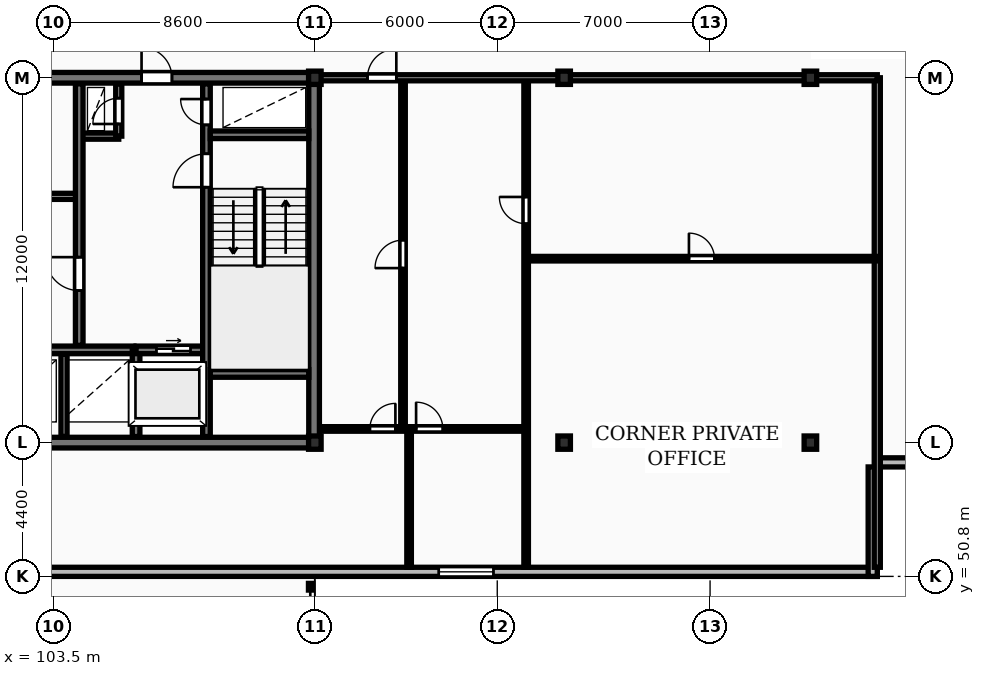
"""IFC4 building model, lengths in metres.
Left out: names, types, materials, properties, quantities, classifications, styles, units other than length and angle.
Written with IfcOpenShell. Run it as: python <this file> out.ifc"""

import sys

from ifc_helpers import new_model, si_unit, direction, frame, frame_2d, origin, origin_2d, place, context, subcontext, project, spatial, rectangle, i_section, extrude, element, fill, save


model = new_model("IFC4")
c1 = context("Model", 3, precision=1e-05, world=origin(), true_north=direction((0.0, 1.0)))
c2 = subcontext(c1, "Body", "Model", "MODEL_VIEW")
j1 = project(units=[si_unit("LENGTHUNIT", "METRE"), si_unit("PLANEANGLEUNIT", "RADIAN")], contexts=[c1])
p1 = place(None, origin())
s1 = spatial("IfcSite", under=j1, at=p1, CompositionType="ELEMENT")
p2 = place(p1, origin())
s2 = spatial("IfcBuilding", under=s1, at=p2, CompositionType="ELEMENT")
p3 = place(p2, frame((0.0, 0.0, 142.9)))
s3 = spatial("IfcBuildingStorey", under=s2, at=p3, CompositionType="ELEMENT", Elevation=142.9)
for number, where, z_axis, x_axis in (
    (1, (112.1, 55.2, 0.0), (0.0, 0.0, 1.0), (1.0, 0.0, 0.0)),
    (2, (112.1, 67.2, 0.0), (0.0, 0.0, 1.0), (1.0, 0.0, 0.0)),
    (3, (120.3, 55.2, 0.0), (0.0, 0.0, 1.0), (1.0, 0.0, 0.0)),
    (4, (120.3, 67.2, 0.0), (0.0, 0.0, 1.0), (1.0, 0.0, 0.0)),
    (5, (128.4, 55.2, 0.0), (0.0, 0.0, 1.0), (1.0, 0.0, 0.0)),
    (6, (128.4, 67.2, 0.0), (0.0, 0.0, 1.0), (1.0, 0.0, 0.0)),
):
    element("IfcColumn", number, at=place(p3, frame(where, z_axis=z_axis, x_axis=x_axis)), inside=s3, PredefinedType="COLUMN", context=c2, shape_type="SweptSolid", body=[
        extrude(i_section(OverallWidth=0.412, OverallDepth=0.437, WebThickness=0.036, FlangeThickness=0.052, FilletRadius=0.015, at=origin_2d()), origin(), (0.0, 0.0, 1.0), 3.6),
    ])
p4 = place(p3, frame((57.6, 50.95, 0.0), z_axis=(0.0, 0.0, 1.0), x_axis=(1.0, 0.0, 0.0)))
e7 = element("IfcWall", 7, at=p4, inside=s3, PredefinedType="STANDARD", context=c2, shape_type="SweptSolid", body=[
    extrude(rectangle(XDim=73.0, YDim=0.3, at=frame_2d((36.5, 0.0))), origin(), (0.0, 0.0, 1.0), 3.31),
])
p5 = place(p4, frame((15.225, 0.0, 0.85)))
e8 = element("IfcOpeningElement", 8, at=p5, cuts=e7, PredefinedType="OPENING", context=c2, shape_type="SweptSolid", body=[
    extrude(rectangle(XDim=1.8, YDim=1.8, at=frame_2d((0.9, 0.9))), frame((0.0, 0.16, 0.0), z_axis=(0.0, -1.0, 0.0), x_axis=(1.0, 0.0, 0.0)), (0.0, 0.0, 1.0), 0.32),
])
p6 = place(p4, frame((58.575, 0.0, 0.85)))
e9 = element("IfcOpeningElement", 9, at=p6, cuts=e7, PredefinedType="OPENING", context=c2, shape_type="SweptSolid", body=[
    extrude(rectangle(XDim=1.8, YDim=1.8, at=frame_2d((0.9, 0.9))), frame((0.0, 0.16, 0.0), z_axis=(0.0, -1.0, 0.0), x_axis=(1.0, 0.0, 0.0)), (0.0, 0.0, 1.0), 0.32),
])
p7 = place(p4, frame((33.45, 0.0, 0.0)))
e10 = element("IfcOpeningElement", 10, at=p7, cuts=e7, PredefinedType="OPENING", context=c2, shape_type="SweptSolid", body=[
    extrude(rectangle(XDim=1.1, YDim=2.1, at=frame_2d((0.55, 1.05))), frame((0.0, 0.16, 0.0), z_axis=(0.0, -1.0, 0.0), x_axis=(1.0, 0.0, 0.0)), (0.0, 0.0, 1.0), 0.32),
])
for number, where, z_axis, x_axis in (
    (11, (130.45, 50.8, 0.0), (0.0, 0.0, 1.0), (0.0, 1.0, 0.0)),
    (12, (130.6, 54.55, 0.0), (0.0, 0.0, 1.0), (1.0, 0.0, 0.0)),
):
    element("IfcWall", number, at=place(p3, frame(where, z_axis=z_axis, x_axis=x_axis)), inside=s3, PredefinedType="STANDARD", context=c2, shape_type="SweptSolid", body=[
        extrude(rectangle(XDim=3.6, YDim=0.3, at=frame_2d((1.8, 0.0))), origin(), (0.0, 0.0, 1.0), 3.31),
    ])
p8 = place(p3, frame((75.95, 55.2, 0.0), z_axis=(0.0, 0.0, 1.0), x_axis=(1.0, 0.0, 0.0)))
e13 = element("IfcWall", 13, at=p8, inside=s3, PredefinedType="SHEAR", context=c2, shape_type="SweptSolid", body=[
    extrude(rectangle(XDim=36.3, YDim=0.35, at=frame_2d((18.15, 0.0))), origin(), (0.0, 0.0, 1.0), 3.6),
])
p9 = place(p8, frame((15.1, 0.0, 0.0)))
e14 = element("IfcOpeningElement", 14, at=p9, cuts=e13, PredefinedType="OPENING", context=c2, shape_type="SweptSolid", body=[
    extrude(rectangle(XDim=1.1, YDim=2.1, at=frame_2d((0.55, 1.05))), frame((0.0, 0.185, 0.0), z_axis=(0.0, -1.0, 0.0), x_axis=(1.0, 0.0, 0.0)), (0.0, 0.0, 1.0), 0.37),
])
p10 = place(p3, frame((112.075, 55.375, 0.0), z_axis=(0.0, 0.0, 1.0), x_axis=(0.0, 1.0, 0.0)))
e15 = element("IfcWall", 15, at=p10, inside=s3, PredefinedType="SHEAR", context=c2, shape_type="SweptSolid", body=[
    extrude(rectangle(XDim=11.65, YDim=0.35, at=frame_2d((5.825, 0.0))), origin(), (0.0, 0.0, 1.0), 3.6),
])
p11 = place(p3, frame((75.95, 67.2, 0.0), z_axis=(0.0, 0.0, 1.0), x_axis=(1.0, 0.0, 0.0)))
e16 = element("IfcWall", 16, at=p11, inside=s3, PredefinedType="SHEAR", context=c2, shape_type="SweptSolid", body=[
    extrude(rectangle(XDim=36.3, YDim=0.35, at=frame_2d((18.15, 0.0))), origin(), (0.0, 0.0, 1.0), 3.6),
])
p12 = place(p11, frame((5.25, 0.0, 0.0)))
e17 = element("IfcOpeningElement", 17, at=p12, cuts=e16, PredefinedType="OPENING", context=c2, shape_type="SweptSolid", body=[
    extrude(rectangle(XDim=1.0, YDim=2.15, at=frame_2d((0.5, 1.075))), frame((0.0, 0.185, 0.0), z_axis=(0.0, -1.0, 0.0), x_axis=(1.0, 0.0, 0.0)), (0.0, 0.0, 1.0), 0.37),
])
p13 = place(p11, frame((21.6, 0.0, 0.0)))
e18 = element("IfcOpeningElement", 18, at=p13, cuts=e16, PredefinedType="OPENING", context=c2, shape_type="SweptSolid", body=[
    extrude(rectangle(XDim=1.5, YDim=2.2, at=frame_2d((0.75, 1.1))), frame((0.0, 0.185, 0.0), z_axis=(0.0, -1.0, 0.0), x_axis=(1.0, 0.0, 0.0)), (0.0, 0.0, 1.0), 0.37),
])
p14 = place(p11, frame((30.45, 0.0, 0.0)))
e19 = element("IfcOpeningElement", 19, at=p14, cuts=e16, PredefinedType="OPENING", context=c2, shape_type="SweptSolid", body=[
    extrude(rectangle(XDim=1.0, YDim=2.15, at=frame_2d((0.5, 1.075))), frame((0.0, 0.185, 0.0), z_axis=(0.0, -1.0, 0.0), x_axis=(1.0, 0.0, 0.0)), (0.0, 0.0, 1.0), 0.37),
])
p15 = place(p3, frame((103.85, 55.4, 0.0), z_axis=(0.0, 0.0, 1.0), x_axis=(0.0, 1.0, 0.0)))
e20 = element("IfcWall", 20, at=p15, inside=s3, PredefinedType="PARTITIONING", context=c2, shape_type="SweptSolid", body=[
    extrude(rectangle(XDim=2.72, YDim=0.2, at=frame_2d((1.36, 0.0))), origin(), (0.0, 0.0, 1.0), 3.31),
])
p16 = place(p3, frame((101.55, 58.25, 0.0), z_axis=(0.0, 0.0, 1.0), x_axis=(1.0, 0.0, 0.0)))
e21 = element("IfcWall", 21, at=p16, inside=s3, PredefinedType="SHEAR", context=c2, shape_type="SweptSolid", body=[
    extrude(rectangle(XDim=4.6, YDim=0.25, at=frame_2d((2.3, 0.0))), origin(), (0.0, 0.0, 1.0), 3.6),
])
p17 = place(p3, frame((106.22, 55.4, 0.0), z_axis=(0.0, 0.0, 1.0), x_axis=(0.0, 1.0, 0.0)))
e22 = element("IfcWall", 22, at=p17, inside=s3, PredefinedType="SHEAR", context=c2, shape_type="SweptSolid", body=[
    extrude(rectangle(XDim=2.85, YDim=0.25, at=frame_2d((1.425, 0.0))), origin(), (0.0, 0.0, 1.0), 3.6),
])
p18 = place(p3, frame((106.22, 58.25, 0.0), z_axis=(0.0, 0.0, 1.0), x_axis=(1.0, 0.0, 0.0)))
e23 = element("IfcWall", 23, at=p18, inside=s3, PredefinedType="SHEAR", context=c2, shape_type="SweptSolid", body=[
    extrude(rectangle(XDim=2.46, YDim=0.25, at=frame_2d((1.23, 0.0))), origin(), (0.0, 0.0, 1.0), 3.6),
])
p19 = place(p18, frame((0.67, 0.0, 0.0)))
e24 = element("IfcOpeningElement", 24, at=p19, cuts=e23, PredefinedType="OPENING", context=c2, shape_type="SweptSolid", body=[
    extrude(rectangle(XDim=1.12, YDim=2.12, at=frame_2d((0.56, 1.06))), frame((0.0, 0.135, 0.0), z_axis=(0.0, -1.0, 0.0), x_axis=(1.0, 0.0, 0.0)), (0.0, 0.0, 1.0), 0.27),
])
p20 = place(p3, frame((84.42, 63.3, 0.0), z_axis=(0.0, 0.0, 1.0), x_axis=(1.0, 0.0, 0.0)))
e25 = element("IfcWall", 25, at=p20, inside=s3, PredefinedType="PARTITIONING", context=c2, shape_type="SweptSolid", body=[
    extrude(rectangle(XDim=19.83, YDim=0.2, at=frame_2d((9.915, 0.0))), origin(), (0.0, 0.0, 1.0), 3.31),
])
p21 = place(p20, frame((1.15, 0.0, 0.0)))
e26 = element("IfcOpeningElement", 26, at=p21, cuts=e25, PredefinedType="OPENING", context=c2, shape_type="SweptSolid", body=[
    extrude(rectangle(XDim=0.85, YDim=2.05, at=frame_2d((0.425, 1.025))), frame((0.0, 0.11, 0.0), z_axis=(0.0, -1.0, 0.0), x_axis=(1.0, 0.0, 0.0)), (0.0, 0.0, 1.0), 0.22),
])
p22 = place(p20, frame((3.25, 0.0, 0.0)))
e27 = element("IfcOpeningElement", 27, at=p22, cuts=e25, PredefinedType="OPENING", context=c2, shape_type="SweptSolid", body=[
    extrude(rectangle(XDim=0.85, YDim=2.05, at=frame_2d((0.425, 1.025))), frame((0.0, 0.11, 0.0), z_axis=(0.0, -1.0, 0.0), x_axis=(1.0, 0.0, 0.0)), (0.0, 0.0, 1.0), 0.22),
])
p23 = place(p20, frame((13.08, 0.0, 0.0)))
e28 = element("IfcOpeningElement", 28, at=p23, cuts=e25, PredefinedType="OPENING", context=c2, shape_type="SweptSolid", body=[
    extrude(rectangle(XDim=1.5, YDim=2.2, at=frame_2d((0.75, 1.1))), frame((0.0, 0.11, 0.0), z_axis=(0.0, -1.0, 0.0), x_axis=(1.0, 0.0, 0.0)), (0.0, 0.0, 1.0), 0.22),
])
p24 = place(p20, frame((6.68, 0.0, 0.0)))
e29 = element("IfcOpeningElement", 29, at=p24, cuts=e25, PredefinedType="OPENING", context=c2, shape_type="SweptSolid", body=[
    extrude(rectangle(XDim=0.92, YDim=2.08, at=frame_2d((0.46, 1.04))), frame((0.0, 0.11, 0.0), z_axis=(0.0, -1.0, 0.0), x_axis=(1.0, 0.0, 0.0)), (0.0, 0.0, 1.0), 0.22),
])
p25 = place(p20, frame((16.33, 0.0, 0.0)))
e30 = element("IfcOpeningElement", 30, at=p25, cuts=e25, PredefinedType="OPENING", context=c2, shape_type="SweptSolid", body=[
    extrude(rectangle(XDim=0.88, YDim=2.06, at=frame_2d((0.44, 1.03))), frame((0.0, 0.11, 0.0), z_axis=(0.0, -1.0, 0.0), x_axis=(1.0, 0.0, 0.0)), (0.0, 0.0, 1.0), 0.22),
])
p26 = place(p3, frame((104.45, 65.28, 0.0), z_axis=(0.0, 0.0, 1.0), x_axis=(1.0, 0.0, 0.0)))
e31 = element("IfcWall", 31, at=p26, inside=s3, PredefinedType="PARTITIONING", context=c2, shape_type="SweptSolid", body=[
    extrude(rectangle(XDim=1.2, YDim=0.2, at=frame_2d((0.6, 0.0))), origin(), (0.0, 0.0, 1.0), 3.31),
])
p27 = place(p3, frame((105.65, 65.28, 0.0), z_axis=(0.0, 0.0, 1.0), x_axis=(0.0, 1.0, 0.0)))
e32 = element("IfcWall", 32, at=p27, inside=s3, PredefinedType="PARTITIONING", context=c2, shape_type="SweptSolid", body=[
    extrude(rectangle(XDim=1.72, YDim=0.2, at=frame_2d((0.86, 0.0))), origin(), (0.0, 0.0, 1.0), 3.31),
])
p28 = place(p27, frame((0.4, 0.0, 0.0)))
e33 = element("IfcOpeningElement", 33, at=p28, cuts=e32, PredefinedType="OPENING", context=c2, shape_type="SweptSolid", body=[
    extrude(rectangle(XDim=0.85, YDim=2.05, at=frame_2d((0.425, 1.025))), frame((0.0, 0.11, 0.0), z_axis=(0.0, -1.0, 0.0), x_axis=(1.0, 0.0, 0.0)), (0.0, 0.0, 1.0), 0.22),
])
p29 = place(p3, frame((104.35, 58.4, 0.0), z_axis=(0.0, 0.0, 1.0), x_axis=(0.0, 1.0, 0.0)))
e34 = element("IfcWall", 34, at=p29, inside=s3, PredefinedType="SHEAR", context=c2, shape_type="SweptSolid", body=[
    extrude(rectangle(XDim=8.6, YDim=0.25, at=frame_2d((4.3, 0.0))), origin(), (0.0, 0.0, 1.0), 3.6),
])
p30 = place(p29, frame((1.8, 0.0, 0.0)))
e35 = element("IfcOpeningElement", 35, at=p30, cuts=e34, PredefinedType="OPENING", context=c2, shape_type="SweptSolid", body=[
    extrude(rectangle(XDim=1.1, YDim=2.1, at=frame_2d((0.55, 1.05))), frame((0.0, 0.135, 0.0), z_axis=(0.0, -1.0, 0.0), x_axis=(1.0, 0.0, 0.0)), (0.0, 0.0, 1.0), 0.27),
])
p31 = place(p3, frame((108.535, 55.4, 0.0), z_axis=(0.0, 0.0, 1.0), x_axis=(0.0, 1.0, 0.0)))
e36 = element("IfcWall", 36, at=p31, inside=s3, PredefinedType="SHEAR", context=c2, shape_type="SweptSolid", body=[
    extrude(rectangle(XDim=11.6, YDim=0.25, at=frame_2d((5.8, 0.0))), origin(), (0.0, 0.0, 1.0), 3.6),
])
p32 = place(p31, frame((8.2, 0.0, 0.0)))
e37 = element("IfcOpeningElement", 37, at=p32, cuts=e36, PredefinedType="OPENING", context=c2, shape_type="SweptSolid", body=[
    extrude(rectangle(XDim=1.1, YDim=2.1, at=frame_2d((0.55, 1.05))), frame((0.0, 0.135, 0.0), z_axis=(0.0, -1.0, 0.0), x_axis=(1.0, 0.0, 0.0)), (0.0, 0.0, 1.0), 0.27),
])
p33 = place(p31, frame((10.25, 0.0, 0.0)))
e38 = element("IfcOpeningElement", 38, at=p33, cuts=e36, PredefinedType="OPENING", context=c2, shape_type="SweptSolid", body=[
    extrude(rectangle(XDim=0.85, YDim=2.05, at=frame_2d((0.425, 1.025))), frame((0.0, 0.135, 0.0), z_axis=(0.0, -1.0, 0.0), x_axis=(1.0, 0.0, 0.0)), (0.0, 0.0, 1.0), 0.27),
])
for number, where, z_axis, x_axis in (
    (39, (108.66, 57.475, 0.0), (0.0, 0.0, 1.0), (1.0, 0.0, 0.0)),
    (40, (108.66, 65.325, 0.0), (0.0, 0.0, 1.0), (1.0, 0.0, 0.0)),
):
    element("IfcWall", number, at=place(p3, frame(where, z_axis=z_axis, x_axis=x_axis)), inside=s3, PredefinedType="SHEAR", context=c2, shape_type="SweptSolid", body=[
        extrude(rectangle(XDim=3.24, YDim=0.25, at=frame_2d((1.62, 0.0))), origin(), (0.0, 0.0, 1.0), 3.6),
    ])
p34 = place(p3, frame((130.6, 51.1, 0.0), z_axis=(0.0, 0.0, 1.0), x_axis=(0.0, 1.0, 0.0)))
e41 = element("IfcWall", 41, at=p34, inside=s3, PredefinedType="PARTITIONING", context=c2, shape_type="SweptSolid", body=[
    extrude(rectangle(XDim=16.1, YDim=0.2, at=frame_2d((8.05, 0.0))), origin(), (0.0, 0.0, 1.0), 3.31),
])
p35 = place(p3, frame((119.05, 61.25, 0.0), z_axis=(0.0, 0.0, 1.0), x_axis=(1.0, 0.0, 0.0)))
e42 = element("IfcWall", 42, at=p35, inside=s3, PredefinedType="PARTITIONING", context=c2, shape_type="SweptSolid", body=[
    extrude(rectangle(XDim=11.55, YDim=0.15, at=frame_2d((5.775, 0.0))), origin(), (0.0, 0.0, 1.0), 3.31),
])
p36 = place(p35, frame((5.355, 0.0, 0.0)))
e43 = element("IfcOpeningElement", 43, at=p36, cuts=e42, PredefinedType="OPENING", context=c2, shape_type="SweptSolid", body=[
    extrude(rectangle(XDim=0.84, YDim=2.04, at=frame_2d((0.42, 1.02))), frame((0.0, 0.085, 0.0), z_axis=(0.0, -1.0, 0.0), x_axis=(1.0, 0.0, 0.0)), (0.0, 0.0, 1.0), 0.17),
])
p37 = place(p3, frame((119.05, 51.1, 0.0), z_axis=(0.0, 0.0, 1.0), x_axis=(0.0, 1.0, 0.0)))
e44 = element("IfcWall", 44, at=p37, inside=s3, PredefinedType="PARTITIONING", context=c2, shape_type="SweptSolid", body=[
    extrude(rectangle(XDim=16.05, YDim=0.15, at=frame_2d((8.025, 0.0))), origin(), (0.0, 0.0, 1.0), 3.31),
])
p38 = place(p37, frame((11.3, 0.0, 0.0)))
e45 = element("IfcOpeningElement", 45, at=p38, cuts=e44, PredefinedType="OPENING", context=c2, shape_type="SweptSolid", body=[
    extrude(rectangle(XDim=0.88, YDim=2.06, at=frame_2d((0.44, 1.03))), frame((0.0, 0.085, 0.0), z_axis=(0.0, -1.0, 0.0), x_axis=(1.0, 0.0, 0.0)), (0.0, 0.0, 1.0), 0.17),
])
p39 = place(p3, frame((115.0, 55.65, 0.0), z_axis=(0.0, 0.0, 1.0), x_axis=(0.0, 1.0, 0.0)))
e46 = element("IfcWall", 46, at=p39, inside=s3, PredefinedType="PARTITIONING", context=c2, shape_type="SweptSolid", body=[
    extrude(rectangle(XDim=11.5, YDim=0.15, at=frame_2d((5.75, 0.0))), origin(), (0.0, 0.0, 1.0), 3.31),
])
p40 = place(p39, frame((5.29, 0.0, 0.0)))
e47 = element("IfcOpeningElement", 47, at=p40, cuts=e46, PredefinedType="OPENING", context=c2, shape_type="SweptSolid", body=[
    extrude(rectangle(XDim=0.92, YDim=2.08, at=frame_2d((0.46, 1.04))), frame((0.0, 0.085, 0.0), z_axis=(0.0, -1.0, 0.0), x_axis=(1.0, 0.0, 0.0)), (0.0, 0.0, 1.0), 0.17),
])
p41 = place(p3, frame((115.2, 51.1, 0.0), z_axis=(0.0, 0.0, 1.0), x_axis=(0.0, 1.0, 0.0)))
e48 = element("IfcWall", 48, at=p41, inside=s3, PredefinedType="PARTITIONING", context=c2, shape_type="SweptSolid", body=[
    extrude(rectangle(XDim=4.55, YDim=0.15, at=frame_2d((2.275, 0.0))), origin(), (0.0, 0.0, 1.0), 3.31),
])
p42 = place(p3, frame((112.27, 55.65, 0.0), z_axis=(0.0, 0.0, 1.0), x_axis=(1.0, 0.0, 0.0)))
e49 = element("IfcWall", 49, at=p42, inside=s3, PredefinedType="PARTITIONING", context=c2, shape_type="SweptSolid", body=[
    extrude(rectangle(XDim=6.76, YDim=0.15, at=frame_2d((3.38, 0.0))), origin(), (0.0, 0.0, 1.0), 3.31),
])
p43 = place(p42, frame((1.64, 0.0, 0.0)))
e50 = element("IfcOpeningElement", 50, at=p43, cuts=e49, PredefinedType="OPENING", context=c2, shape_type="SweptSolid", body=[
    extrude(rectangle(XDim=0.84, YDim=2.04, at=frame_2d((0.42, 1.02))), frame((0.0, 0.085, 0.0), z_axis=(0.0, -1.0, 0.0), x_axis=(1.0, 0.0, 0.0)), (0.0, 0.0, 1.0), 0.17),
])
p44 = place(p42, frame((3.16, 0.0, 0.0)))
e51 = element("IfcOpeningElement", 51, at=p44, cuts=e49, PredefinedType="OPENING", context=c2, shape_type="SweptSolid", body=[
    extrude(rectangle(XDim=0.88, YDim=2.06, at=frame_2d((0.44, 1.03))), frame((0.0, 0.085, 0.0), z_axis=(0.0, -1.0, 0.0), x_axis=(1.0, 0.0, 0.0)), (0.0, 0.0, 1.0), 0.17),
])
p45 = place(p3, frame((112.25, 67.2, 0.0), z_axis=(0.0, 0.0, 1.0), x_axis=(1.0, 0.0, 0.0)))
e52 = element("IfcWall", 52, at=p45, inside=s3, PredefinedType="PARTITIONING", context=c2, shape_type="SweptSolid", body=[
    extrude(rectangle(XDim=18.35, YDim=0.2, at=frame_2d((9.175, 0.0))), origin(), (0.0, 0.0, 1.0), 2.773),
])
p46 = place(p45, frame((1.58, 0.0, 0.0)))
e53 = element("IfcOpeningElement", 53, at=p46, cuts=e52, PredefinedType="OPENING", context=c2, shape_type="SweptSolid", body=[
    extrude(rectangle(XDim=0.95, YDim=2.15, at=frame_2d((0.475, 1.075))), frame((0.0, 0.11, 0.0), z_axis=(0.0, -1.0, 0.0), x_axis=(1.0, 0.0, 0.0)), (0.0, 0.0, 1.0), 0.22),
])
p47 = place(p6, origin())
e54 = element("IfcWindow", 54, at=p47, inside=s3, PartitioningType="SINGLE_PANEL", PredefinedType="WINDOW", context=c2, shape_type="SweptSolid", body=[
    extrude(rectangle(XDim=1.8, YDim=1.8, at=frame_2d((0.9, 0.9))), frame((0.0, 0.03, 0.0), z_axis=(0.0, -1.0, 0.0), x_axis=(1.0, 0.0, 0.0)), (0.0, 0.0, 1.0), 0.06),
])
fill(e9, e54)
p48 = place(p14, origin())
e55 = element("IfcDoor", 55, at=p48, inside=s3, OperationType="SINGLE_SWING_LEFT", PredefinedType="DOOR", context=c2, shape_type="SweptSolid", body=[
    extrude(rectangle(XDim=1.0, YDim=2.15, at=frame_2d((0.5, 1.075))), frame((0.0, 0.025, 0.0), z_axis=(0.0, -1.0, 0.0), x_axis=(1.0, 0.0, 0.0)), (0.0, 0.0, 1.0), 0.05),
])
fill(e19, e55)
p49 = place(p19, origin())
e56 = element("IfcDoor", 56, at=p49, inside=s3, OperationType="SLIDING_TO_RIGHT", PredefinedType="DOOR", context=c2, shape_type="SweptSolid", body=[
    extrude(rectangle(XDim=1.12, YDim=2.12, at=frame_2d((0.56, 1.06))), frame((0.0, 0.025, 0.0), z_axis=(0.0, -1.0, 0.0), x_axis=(1.0, 0.0, 0.0)), (0.0, 0.0, 1.0), 0.05),
])
fill(e24, e56)
p50 = place(p28, origin())
e57 = element("IfcDoor", 57, at=p50, inside=s3, OperationType="SINGLE_SWING_LEFT", PredefinedType="DOOR", context=c2, shape_type="SweptSolid", body=[
    extrude(rectangle(XDim=0.85, YDim=2.05, at=frame_2d((0.425, 1.025))), frame((0.0, 0.025, 0.0), z_axis=(0.0, -1.0, 0.0), x_axis=(1.0, 0.0, 0.0)), (0.0, 0.0, 1.0), 0.05),
])
fill(e33, e57)
p51 = place(p30, origin())
e58 = element("IfcDoor", 58, at=p51, inside=s3, OperationType="SINGLE_SWING_RIGHT", PredefinedType="DOOR", context=c2, shape_type="SweptSolid", body=[
    extrude(rectangle(XDim=1.1, YDim=2.1, at=frame_2d((0.55, 1.05))), frame((0.0, 0.025, 0.0), z_axis=(0.0, -1.0, 0.0), x_axis=(1.0, 0.0, 0.0)), (0.0, 0.0, 1.0), 0.05),
])
fill(e35, e58)
p52 = place(p32, origin())
e59 = element("IfcDoor", 59, at=p52, inside=s3, OperationType="SINGLE_SWING_LEFT", PredefinedType="DOOR", context=c2, shape_type="SweptSolid", body=[
    extrude(rectangle(XDim=1.1, YDim=2.1, at=frame_2d((0.55, 1.05))), frame((0.0, 0.025, 0.0), z_axis=(0.0, -1.0, 0.0), x_axis=(1.0, 0.0, 0.0)), (0.0, 0.0, 1.0), 0.05),
])
fill(e37, e59)
p53 = place(p33, origin())
e60 = element("IfcDoor", 60, at=p53, inside=s3, OperationType="SINGLE_SWING_RIGHT", PredefinedType="DOOR", context=c2, shape_type="SweptSolid", body=[
    extrude(rectangle(XDim=0.85, YDim=2.05, at=frame_2d((0.425, 1.025))), frame((0.0, 0.025, 0.0), z_axis=(0.0, -1.0, 0.0), x_axis=(1.0, 0.0, 0.0)), (0.0, 0.0, 1.0), 0.05),
])
fill(e38, e60)
p54 = place(p36, origin())
e61 = element("IfcDoor", 61, at=p54, inside=s3, OperationType="SINGLE_SWING_LEFT", PredefinedType="DOOR", context=c2, shape_type="SweptSolid", body=[
    extrude(rectangle(XDim=0.84, YDim=2.04, at=frame_2d((0.42, 1.02))), frame((0.0, 0.025, 0.0), z_axis=(0.0, -1.0, 0.0), x_axis=(1.0, 0.0, 0.0)), (0.0, 0.0, 1.0), 0.05),
])
fill(e43, e61)
p55 = place(p38, origin())
e62 = element("IfcDoor", 62, at=p55, inside=s3, OperationType="SINGLE_SWING_RIGHT", PredefinedType="DOOR", context=c2, shape_type="SweptSolid", body=[
    extrude(rectangle(XDim=0.88, YDim=2.06, at=frame_2d((0.44, 1.03))), frame((0.0, 0.025, 0.0), z_axis=(0.0, -1.0, 0.0), x_axis=(1.0, 0.0, 0.0)), (0.0, 0.0, 1.0), 0.05),
])
fill(e45, e62)
p56 = place(p40, origin())
e63 = element("IfcDoor", 63, at=p56, inside=s3, OperationType="SINGLE_SWING_LEFT", PredefinedType="DOOR", context=c2, shape_type="SweptSolid", body=[
    extrude(rectangle(XDim=0.92, YDim=2.08, at=frame_2d((0.46, 1.04))), frame((0.0, 0.025, 0.0), z_axis=(0.0, -1.0, 0.0), x_axis=(1.0, 0.0, 0.0)), (0.0, 0.0, 1.0), 0.05),
])
fill(e47, e63)
p57 = place(p43, origin())
e64 = element("IfcDoor", 64, at=p57, inside=s3, OperationType="SINGLE_SWING_RIGHT", PredefinedType="DOOR", context=c2, shape_type="SweptSolid", body=[
    extrude(rectangle(XDim=0.84, YDim=2.04, at=frame_2d((0.42, 1.02))), frame((0.0, 0.025, 0.0), z_axis=(0.0, -1.0, 0.0), x_axis=(1.0, 0.0, 0.0)), (0.0, 0.0, 1.0), 0.05),
])
fill(e50, e64)
p58 = place(p44, origin())
e65 = element("IfcDoor", 65, at=p58, inside=s3, OperationType="SINGLE_SWING_LEFT", PredefinedType="DOOR", context=c2, shape_type="SweptSolid", body=[
    extrude(rectangle(XDim=0.88, YDim=2.06, at=frame_2d((0.44, 1.03))), frame((0.0, 0.025, 0.0), z_axis=(0.0, -1.0, 0.0), x_axis=(1.0, 0.0, 0.0)), (0.0, 0.0, 1.0), 0.05),
])
fill(e51, e65)
p59 = place(p46, origin())
e66 = element("IfcDoor", 66, at=p59, inside=s3, OperationType="SINGLE_SWING_RIGHT", PredefinedType="DOOR", context=c2, shape_type="SweptSolid", body=[
    extrude(rectangle(XDim=0.95, YDim=2.15, at=frame_2d((0.475, 1.075))), frame((0.0, 0.025, 0.0), z_axis=(0.0, -1.0, 0.0), x_axis=(1.0, 0.0, 0.0)), (0.0, 0.0, 1.0), 0.05),
])
fill(e53, e66)
save(model, sys.argv[1])
